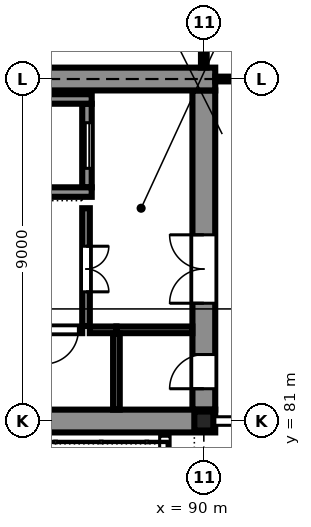
"""IFC4 building model, lengths in metres.
Left out: names, types, materials, properties, quantities, classifications, styles, units other than length and angle.
Written with IfcOpenShell. Run it as: python <this file> out.ifc"""

import sys

from ifc_helpers import new_model, si_unit, direction, frame, frame_2d, origin, origin_2d, place, context, subcontext, project, spatial, polyline, rectangle, hollow_rectangle, outline, extrude, element, fill, save


model = new_model("IFC4")
c1 = context("Model", 3, precision=1e-05, world=origin(), true_north=direction((0.0, 1.0)))
c2 = subcontext(c1, "Body", "Model", "MODEL_VIEW")
j1 = project(units=[si_unit("LENGTHUNIT", "METRE"), si_unit("PLANEANGLEUNIT", "RADIAN")], contexts=[c1])
p1 = place(None, origin())
s1 = spatial("IfcSite", under=j1, at=p1, CompositionType="ELEMENT")
p2 = place(p1, origin())
s2 = spatial("IfcBuilding", under=s1, at=p2, CompositionType="ELEMENT")
p3 = place(p2, frame((0.0, 0.0, 7.5)))
s3 = spatial("IfcBuildingStorey", under=s2, at=p3, CompositionType="ELEMENT", Elevation=7.5)
p4 = place(p3, frame((90.0, 81.0, 0.0), z_axis=(0.0, 0.0, 1.0), x_axis=(1.0, 0.0, 0.0)))
e1 = element("IfcColumn", 1, at=p4, inside=s3, PredefinedType="COLUMN", context=c2, shape_type="SweptSolid", body=[
    extrude(hollow_rectangle(XDim=0.5, YDim=0.5, WallThickness=0.032, at=origin_2d()), origin(), (0.0, 0.0, 1.0), 4.2),
])
p5 = place(p3, frame((71.7, 81.0, 0.0), z_axis=(0.0, 0.0, 1.0), x_axis=(1.0, 0.0, 0.0)))
e2 = element("IfcWall", 2, at=p5, inside=s3, PredefinedType="SOLIDWALL", context=c2, shape_type="SweptSolid", body=[
    extrude(rectangle(XDim=18.6, YDim=0.6, at=frame_2d((9.3, 0.0))), origin(), (0.0, 0.0, 1.0), 4.2),
])
p6 = place(p5, frame((1.6, 0.0, 0.0)))
e3 = element("IfcOpeningElement", 3, at=p6, cuts=e2, PredefinedType="OPENING", context=c2, shape_type="SweptSolid", body=[
    extrude(rectangle(XDim=1.8, YDim=2.1, at=frame_2d((0.9, 1.05))), frame((0.0, 0.31, 0.0), z_axis=(0.0, -1.0, 0.0), x_axis=(1.0, 0.0, 0.0)), (0.0, 0.0, 1.0), 0.62),
])
p7 = place(p5, frame((5.6, 0.0, 0.0)))
e4 = element("IfcOpeningElement", 4, at=p7, cuts=e2, PredefinedType="OPENING", context=c2, shape_type="SweptSolid", body=[
    extrude(rectangle(XDim=1.8, YDim=2.1, at=frame_2d((0.9, 1.05))), frame((0.0, 0.31, 0.0), z_axis=(0.0, -1.0, 0.0), x_axis=(1.0, 0.0, 0.0)), (0.0, 0.0, 1.0), 0.62),
])
p8 = place(p5, frame((9.1, 0.0, 0.0)))
e5 = element("IfcOpeningElement", 5, at=p8, cuts=e2, PredefinedType="OPENING", context=c2, shape_type="SweptSolid", body=[
    extrude(rectangle(XDim=1.8, YDim=2.1, at=frame_2d((0.9, 1.05))), frame((0.0, 0.31, 0.0), z_axis=(0.0, -1.0, 0.0), x_axis=(1.0, 0.0, 0.0)), (0.0, 0.0, 1.0), 0.62),
])
p9 = place(p3, frame((71.7, 90.0, 0.0), z_axis=(0.0, 0.0, 1.0), x_axis=(1.0, 0.0, 0.0)))
e6 = element("IfcWall", 6, at=p9, inside=s3, PredefinedType="SOLIDWALL", context=c2, shape_type="SweptSolid", body=[
    extrude(rectangle(XDim=18.6, YDim=0.6, at=frame_2d((9.3, 0.0))), origin(), (0.0, 0.0, 1.0), 4.2),
])
p10 = place(p3, frame((90.0, 81.3, 0.0), z_axis=(0.0, 0.0, 1.0), x_axis=(0.0, 1.0, 0.0)))
e7 = element("IfcWall", 7, at=p10, inside=s3, PredefinedType="SOLIDWALL", context=c2, shape_type="SweptSolid", body=[
    extrude(rectangle(XDim=8.4, YDim=0.6, at=frame_2d((4.2, 0.0))), origin(), (0.0, 0.0, 1.0), 4.2),
])
p11 = place(p10, frame((2.8, 0.0, 0.0)))
e8 = element("IfcOpeningElement", 8, at=p11, cuts=e7, PredefinedType="OPENING", context=c2, shape_type="SweptSolid", body=[
    extrude(rectangle(XDim=1.8, YDim=2.1, at=frame_2d((0.9, 1.05))), frame((0.0, 0.31, 0.0), z_axis=(0.0, -1.0, 0.0), x_axis=(1.0, 0.0, 0.0)), (0.0, 0.0, 1.0), 0.62),
])
p12 = place(p10, frame((0.55, 0.0, 0.0)))
e9 = element("IfcOpeningElement", 9, at=p12, cuts=e7, PredefinedType="OPENING", context=c2, shape_type="SweptSolid", body=[
    extrude(rectangle(XDim=0.9, YDim=2.1, at=frame_2d((0.45, 1.05))), frame((0.0, 0.31, 0.0), z_axis=(0.0, -1.0, 0.0), x_axis=(1.0, 0.0, 0.0)), (0.0, 0.0, 1.0), 0.62),
])
for number, where, z_axis, x_axis in (
    (10, (83.65, 87.025, 0.0), (0.0, 0.0, 1.0), (1.0, 0.0, 0.0)),
    (11, (83.65, 89.475, 0.0), (0.0, 0.0, 1.0), (1.0, 0.0, 0.0)),
):
    element("IfcWall", number, at=place(p3, frame(where, z_axis=z_axis, x_axis=x_axis)), inside=s3, PredefinedType="SOLIDWALL", context=c2, shape_type="SweptSolid", body=[
        extrude(rectangle(XDim=3.4, YDim=0.25, at=frame_2d((1.7, 0.0))), origin(), (0.0, 0.0, 1.0), 3.516),
    ])
p13 = place(p3, frame((86.925, 87.15, 0.0), z_axis=(0.0, 0.0, 1.0), x_axis=(0.0, 1.0, 0.0)))
e12 = element("IfcWall", 12, at=p13, inside=s3, PredefinedType="SOLIDWALL", context=c2, shape_type="SweptSolid", body=[
    extrude(rectangle(XDim=2.2, YDim=0.25, at=frame_2d((1.1, 0.0))), origin(), (0.0, 0.0, 1.0), 3.516),
])
p14 = place(p13, frame((0.5, 0.0, 0.0)))
e13 = element("IfcOpeningElement", 13, at=p14, cuts=e12, PredefinedType="OPENING", context=c2, shape_type="SweptSolid", body=[
    extrude(rectangle(XDim=1.2, YDim=2.1, at=frame_2d((0.6, 1.05))), frame((0.0, 0.135, 0.0), z_axis=(0.0, -1.0, 0.0), x_axis=(1.0, 0.0, 0.0)), (0.0, 0.0, 1.0), 0.27),
])
p15 = place(p3, frame((90.302, 90.0, 0.0), z_axis=(0.0, 0.0, 1.0), x_axis=(1.0, 0.0, 0.0)))
e14 = element("IfcWall", 14, at=p15, inside=s3, PredefinedType="PARTITIONING", context=c2, shape_type="SweptSolid", body=[
    extrude(rectangle(XDim=8.544, YDim=0.125, at=frame_2d((4.272, 0.0))), origin(), (0.0, 0.0, 1.0), 3.307),
])
p16 = place(p15, frame((3.598, 0.0, 0.0)))
e15 = element("IfcOpeningElement", 15, at=p16, cuts=e14, PredefinedType="OPENING", context=c2, shape_type="SweptSolid", body=[
    extrude(rectangle(XDim=1.2, YDim=2.1, at=frame_2d((0.6, 1.05))), frame((0.0, 0.073, 0.0), z_axis=(0.0, -1.0, 0.0), x_axis=(1.0, 0.0, 0.0)), (0.0, 0.0, 1.0), 0.145),
])
p17 = place(p3, frame((90.0, 95.938, 0.0), z_axis=(0.0, 0.0, 1.0), x_axis=(0.0, -1.0, 0.0)))
e16 = element("IfcWall", 16, at=p17, inside=s3, PredefinedType="PARTITIONING", context=c2, shape_type="SweptSolid", body=[
    extrude(rectangle(XDim=5.635, YDim=0.15, at=frame_2d((2.818, 0.0))), origin(), (0.0, 0.0, 1.0), 3.307),
])
p18 = place(p3, frame((86.8, 83.4, 0.0), z_axis=(0.0, 0.0, 1.0), x_axis=(-1.0, 0.0, 0.0)))
e17 = element("IfcWall", 17, at=p18, inside=s3, PredefinedType="PARTITIONING", context=c2, shape_type="SweptSolid", body=[
    extrude(rectangle(XDim=1.1, YDim=0.175, at=frame_2d((0.55, 0.0))), origin(), (0.0, 0.0, 1.0), 3.307),
])
p19 = place(p18, frame((0.1, 0.0, 0.0)))
e18 = element("IfcOpeningElement", 18, at=p19, cuts=e17, PredefinedType="OPENING", context=c2, shape_type="SweptSolid", body=[
    extrude(rectangle(XDim=0.9, YDim=2.1, at=frame_2d((0.45, 1.05))), frame((0.0, 0.097, 0.0), z_axis=(0.0, -1.0, 0.0), x_axis=(1.0, 0.0, 0.0)), (0.0, 0.0, 1.0), 0.195),
])
p20 = place(p3, frame((86.9, 86.6, 0.0), z_axis=(0.0, 0.0, 1.0), x_axis=(0.0, -1.0, 0.0)))
e19 = element("IfcWall", 19, at=p20, inside=s3, PredefinedType="PARTITIONING", context=c2, shape_type="SweptSolid", body=[
    extrude(rectangle(XDim=3.1, YDim=0.2, at=frame_2d((1.55, 0.0))), origin(), (0.0, 0.0, 1.0), 3.382),
])
p21 = place(p20, frame((1.0, 0.0, 0.0)))
e20 = element("IfcOpeningElement", 20, at=p21, cuts=e19, PredefinedType="OPENING", context=c2, shape_type="SweptSolid", body=[
    extrude(rectangle(XDim=1.2, YDim=2.1, at=frame_2d((0.6, 1.05))), frame((0.0, 0.11, 0.0), z_axis=(0.0, -1.0, 0.0), x_axis=(1.0, 0.0, 0.0)), (0.0, 0.0, 1.0), 0.22),
])
p22 = place(p3, frame((89.698, 83.4, 0.0), z_axis=(0.0, 0.0, 1.0), x_axis=(-1.0, 0.0, 0.0)))
e21 = element("IfcWall", 21, at=p22, inside=s3, PredefinedType="PARTITIONING", context=c2, shape_type="SweptSolid", body=[
    extrude(rectangle(XDim=1.998, YDim=0.175, at=frame_2d((0.999, 0.0))), origin(), (0.0, 0.0, 1.0), 3.307),
])
p23 = place(p3, frame((87.7, 83.4, 0.0), z_axis=(0.0, 0.0, 1.0), x_axis=(-1.0, 0.0, 0.0)))
e22 = element("IfcWall", 22, at=p23, inside=s3, PredefinedType="PARTITIONING", context=c2, shape_type="SweptSolid", body=[
    extrude(rectangle(XDim=0.7, YDim=0.175, at=frame_2d((0.35, 0.0))), origin(), (0.0, 0.0, 1.0), 3.307),
])
p24 = place(p3, frame((87.7, 83.3, 0.0), z_axis=(0.0, 0.0, 1.0), x_axis=(0.0, -1.0, 0.0)))
e23 = element("IfcWall", 23, at=p24, inside=s3, PredefinedType="PARTITIONING", context=c2, shape_type="SweptSolid", body=[
    extrude(rectangle(XDim=1.998, YDim=0.175, at=frame_2d((0.999, 0.0))), origin(), (0.0, 0.0, 1.0), 3.307),
])
p25 = place(p14, origin())
e24 = element("IfcDoor", 24, at=p25, inside=s3, OperationType="SLIDING_TO_LEFT", PredefinedType="DOOR", context=c2, shape_type="SweptSolid", body=[
    extrude(outline(polyline([(0.0, 0.0), (0.07, 0.0), (0.07, 2.03), (1.13, 2.03), (1.13, 0.0), (1.2, 0.0), (1.2, 2.1), (0.0, 2.1), (0.0, 0.0)])), frame((0.0, 0.025, 0.0), z_axis=(0.0, -1.0, 0.0), x_axis=(1.0, 0.0, 0.0)), (0.0, 0.0, 1.0), 0.05),
    extrude(rectangle(XDim=0.579, YDim=2.016, at=frame_2d((0.363, 1.018))), frame((0.0, 0.018, 0.0), z_axis=(0.0, -1.0, 0.0), x_axis=(1.0, 0.0, 0.0)), (0.0, 0.0, 1.0), 0.016),
    extrude(rectangle(XDim=0.575, YDim=2.016, at=frame_2d((0.839, 1.018))), frame((0.0, -0.002, 0.0), z_axis=(0.0, -1.0, 0.0), x_axis=(1.0, 0.0, 0.0)), (0.0, 0.0, 1.0), 0.016),
])
fill(e13, e24)
p26 = place(p21, origin())
e25 = element("IfcDoor", 25, at=p26, inside=s3, OperationType="DOUBLE_DOOR_SINGLE_SWING", PredefinedType="DOOR", context=c2, shape_type="SweptSolid", body=[
    extrude(outline(polyline([(0.0, 0.0), (0.07, 0.0), (0.07, 2.03), (1.13, 2.03), (1.13, 0.0), (1.2, 0.0), (1.2, 2.1), (0.0, 2.1), (0.0, 0.0)])), frame((0.0, 0.025, 0.0), z_axis=(0.0, -1.0, 0.0), x_axis=(1.0, 0.0, 0.0)), (0.0, 0.0, 1.0), 0.05),
    extrude(outline(polyline([(0.074, 0.01), (0.597, 0.01), (0.597, 2.026), (0.074, 2.026), (0.074, 0.01)]), holes=[polyline([(0.178, 0.373), (0.492, 0.373), (0.492, 1.784), (0.178, 1.784), (0.178, 0.373)])]), frame((0.0, 0.017, 0.0), z_axis=(0.0, -1.0, 0.0), x_axis=(1.0, 0.0, 0.0)), (0.0, 0.0, 1.0), 0.035),
    extrude(rectangle(XDim=0.314, YDim=1.411, at=frame_2d((0.335, 1.079))), frame((0.0, 0.009, 0.0), z_axis=(0.0, -1.0, 0.0), x_axis=(1.0, 0.0, 0.0)), (0.0, 0.0, 1.0), 0.017),
    extrude(outline(polyline([(0.603, 0.01), (1.126, 0.01), (1.126, 2.026), (0.603, 2.026), (0.603, 0.01)]), holes=[polyline([(0.708, 0.373), (1.021, 0.373), (1.021, 1.784), (0.708, 1.784), (0.708, 0.373)])]), frame((0.0, 0.017, 0.0), z_axis=(0.0, -1.0, 0.0), x_axis=(1.0, 0.0, 0.0)), (0.0, 0.0, 1.0), 0.035),
    extrude(rectangle(XDim=0.314, YDim=1.411, at=frame_2d((0.865, 1.079))), frame((0.0, 0.009, 0.0), z_axis=(0.0, -1.0, 0.0), x_axis=(1.0, 0.0, 0.0)), (0.0, 0.0, 1.0), 0.017),
])
fill(e20, e25)
p27 = place(p11, origin())
e26 = element("IfcDoor", 26, at=p27, inside=s3, OperationType="DOUBLE_DOOR_SINGLE_SWING", PredefinedType="DOOR", context=c2, shape_type="SweptSolid", body=[
    extrude(outline(polyline([(0.0, 0.0), (0.07, 0.0), (0.07, 2.03), (1.73, 2.03), (1.73, 0.0), (1.8, 0.0), (1.8, 2.1), (0.0, 2.1), (0.0, 0.0)])), frame((0.0, 0.025, 0.0), z_axis=(0.0, -1.0, 0.0), x_axis=(1.0, 0.0, 0.0)), (0.0, 0.0, 1.0), 0.05),
    extrude(outline(polyline([(0.074, 0.01), (0.897, 0.01), (0.897, 2.026), (0.074, 2.026), (0.074, 0.01)]), holes=[polyline([(0.194, 0.16), (0.777, 0.16), (0.777, 1.01), (0.194, 1.01), (0.194, 0.16)]), polyline([(0.335, 1.16), (0.635, 1.16), (0.635, 1.76), (0.335, 1.76), (0.335, 1.16)])]), frame((0.0, 0.017, 0.0), z_axis=(0.0, -1.0, 0.0), x_axis=(1.0, 0.0, 0.0)), (0.0, 0.0, 1.0), 0.035),
    extrude(rectangle(XDim=0.583, YDim=0.85, at=frame_2d((0.485, 0.585))), frame((0.0, 0.009, 0.0), z_axis=(0.0, -1.0, 0.0), x_axis=(1.0, 0.0, 0.0)), (0.0, 0.0, 1.0), 0.017),
    extrude(rectangle(XDim=0.3, YDim=0.6, at=frame_2d((0.485, 1.46))), frame((0.0, 0.006, 0.0), z_axis=(0.0, -1.0, 0.0), x_axis=(1.0, 0.0, 0.0)), (0.0, 0.0, 1.0), 0.012),
    extrude(outline(polyline([(0.903, 0.01), (1.726, 0.01), (1.726, 2.026), (0.903, 2.026), (0.903, 0.01)]), holes=[polyline([(1.023, 0.16), (1.606, 0.16), (1.606, 1.01), (1.023, 1.01), (1.023, 0.16)]), polyline([(1.165, 1.16), (1.465, 1.16), (1.465, 1.76), (1.165, 1.76), (1.165, 1.16)])]), frame((0.0, 0.017, 0.0), z_axis=(0.0, -1.0, 0.0), x_axis=(1.0, 0.0, 0.0)), (0.0, 0.0, 1.0), 0.035),
    extrude(rectangle(XDim=0.583, YDim=0.85, at=frame_2d((1.314, 0.585))), frame((0.0, 0.009, 0.0), z_axis=(0.0, -1.0, 0.0), x_axis=(1.0, 0.0, 0.0)), (0.0, 0.0, 1.0), 0.017),
    extrude(rectangle(XDim=0.3, YDim=0.6, at=frame_2d((1.314, 1.46))), frame((0.0, 0.006, 0.0), z_axis=(0.0, -1.0, 0.0), x_axis=(1.0, 0.0, 0.0)), (0.0, 0.0, 1.0), 0.012),
])
fill(e8, e26)
p28 = place(p19, origin())
e27 = element("IfcDoor", 27, at=p28, inside=s3, OperationType="SINGLE_SWING_RIGHT", PredefinedType="DOOR", context=c2, shape_type="SweptSolid", body=[
    extrude(outline(polyline([(0.0, 0.0), (0.07, 0.0), (0.07, 2.03), (0.83, 2.03), (0.83, 0.0), (0.9, 0.0), (0.9, 2.1), (0.0, 2.1), (0.0, 0.0)])), frame((0.0, 0.025, 0.0), z_axis=(0.0, -1.0, 0.0), x_axis=(1.0, 0.0, 0.0)), (0.0, 0.0, 1.0), 0.05),
    extrude(outline(polyline([(0.074, 0.01), (0.826, 0.01), (0.826, 2.026), (0.074, 2.026), (0.074, 0.01)]), holes=[polyline([(0.194, 0.16), (0.706, 0.16), (0.706, 1.01), (0.194, 1.01), (0.194, 0.16)]), polyline([(0.3, 1.16), (0.6, 1.16), (0.6, 1.76), (0.3, 1.76), (0.3, 1.16)])]), frame((0.0, 0.017, 0.0), z_axis=(0.0, -1.0, 0.0), x_axis=(1.0, 0.0, 0.0)), (0.0, 0.0, 1.0), 0.035),
    extrude(rectangle(XDim=0.512, YDim=0.85, at=frame_2d((0.45, 0.585))), frame((0.0, 0.009, 0.0), z_axis=(0.0, -1.0, 0.0), x_axis=(1.0, 0.0, 0.0)), (0.0, 0.0, 1.0), 0.017),
    extrude(rectangle(XDim=0.3, YDim=0.6, at=frame_2d((0.45, 1.46))), frame((0.0, 0.006, 0.0), z_axis=(0.0, -1.0, 0.0), x_axis=(1.0, 0.0, 0.0)), (0.0, 0.0, 1.0), 0.012),
])
fill(e18, e27)
p29 = place(p12, origin())
e28 = element("IfcDoor", 28, at=p29, inside=s3, OperationType="SINGLE_SWING_LEFT", PredefinedType="DOOR", context=c2, shape_type="SweptSolid", body=[
    extrude(outline(polyline([(0.0, 0.0), (0.07, 0.0), (0.07, 2.03), (0.83, 2.03), (0.83, 0.0), (0.9, 0.0), (0.9, 2.1), (0.0, 2.1), (0.0, 0.0)])), frame((0.0, 0.025, 0.0), z_axis=(0.0, -1.0, 0.0), x_axis=(1.0, 0.0, 0.0)), (0.0, 0.0, 1.0), 0.05),
    extrude(outline(polyline([(0.074, 0.01), (0.826, 0.01), (0.826, 2.026), (0.074, 2.026), (0.074, 0.01)]), holes=[polyline([(0.194, 0.16), (0.706, 0.16), (0.706, 1.01), (0.194, 1.01), (0.194, 0.16)]), polyline([(0.3, 1.16), (0.6, 1.16), (0.6, 1.76), (0.3, 1.76), (0.3, 1.16)])]), frame((0.0, 0.017, 0.0), z_axis=(0.0, -1.0, 0.0), x_axis=(1.0, 0.0, 0.0)), (0.0, 0.0, 1.0), 0.035),
    extrude(rectangle(XDim=0.512, YDim=0.85, at=frame_2d((0.45, 0.585))), frame((0.0, 0.009, 0.0), z_axis=(0.0, -1.0, 0.0), x_axis=(1.0, 0.0, 0.0)), (0.0, 0.0, 1.0), 0.017),
    extrude(rectangle(XDim=0.3, YDim=0.6, at=frame_2d((0.45, 1.46))), frame((0.0, 0.006, 0.0), z_axis=(0.0, -1.0, 0.0), x_axis=(1.0, 0.0, 0.0)), (0.0, 0.0, 1.0), 0.012),
])
fill(e9, e28)
save(model, sys.argv[1])
